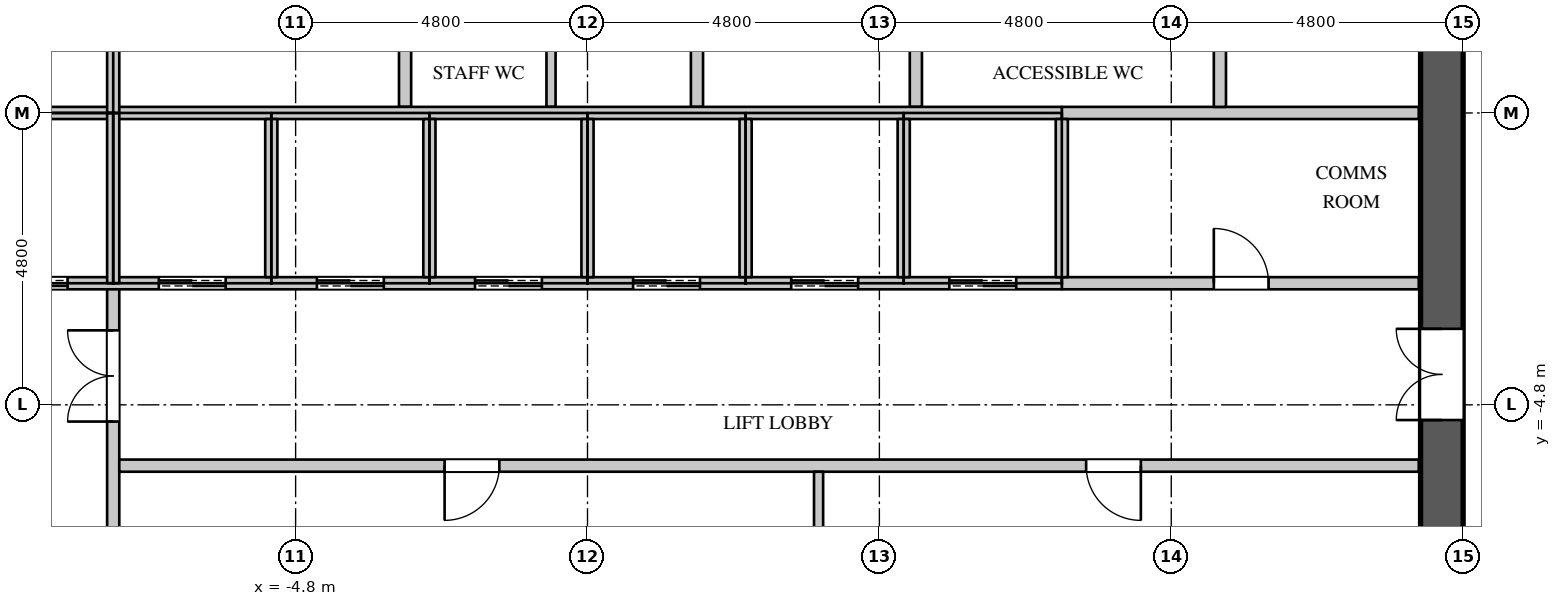
"""IFC4 building model, lengths in metres.
Left out: names, types, materials, properties, quantities, classifications, styles, units other than length and angle.
Written with IfcOpenShell. Run it as: python <this file> out.ifc"""

import sys

from ifc_helpers import new_model, si_unit, direction, frame, frame_2d, origin, place, context, subcontext, project, spatial, rectangle, extrude, element, fill, save


model = new_model("IFC4")
c1 = context("Model", 3, precision=1e-05, world=origin(), true_north=direction((0.0, 1.0)))
c2 = subcontext(c1, "Body", "Model", "MODEL_VIEW")
j1 = project(units=[si_unit("LENGTHUNIT", "METRE"), si_unit("PLANEANGLEUNIT", "RADIAN")], contexts=[c1])
p1 = place(None, origin())
s1 = spatial("IfcSite", under=j1, at=p1, CompositionType="ELEMENT")
p2 = place(p1, origin())
s2 = spatial("IfcBuilding", under=s1, at=p2, CompositionType="ELEMENT")
p3 = place(p2, frame((0.0, 0.0, 187.5)))
s3 = spatial("IfcBuildingStorey", under=s2, at=p3, CompositionType="ELEMENT", Elevation=187.5)
p4 = place(p3, frame((14.05, -11.3, 0.0), z_axis=(0.0, 0.0, 1.0), x_axis=(0.0, 1.0, 0.0)))
e1 = element("IfcWall", 1, at=p4, inside=s3, PredefinedType="SHEAR", context=c2, shape_type="SweptSolid", body=[
    extrude(rectangle(XDim=22.6, YDim=0.7, at=frame_2d((11.3, 0.0))), origin(), (0.0, 0.0, 1.0), 4.2),
])
p5 = place(p4, frame((20.35, 0.0, 0.0)))
e2 = element("IfcOpeningElement", 2, at=p5, cuts=e1, PredefinedType="OPENING", context=c2, shape_type="SweptSolid", body=[
    extrude(rectangle(XDim=1.1, YDim=2.2, at=frame_2d((0.55, 1.1))), frame((0.0, 0.36, 0.0), z_axis=(0.0, -1.0, 0.0), x_axis=(1.0, 0.0, 0.0)), (0.0, 0.0, 1.0), 0.72),
])
p6 = place(p4, frame((1.15, 0.0, 0.0)))
e3 = element("IfcOpeningElement", 3, at=p6, cuts=e1, PredefinedType="OPENING", context=c2, shape_type="SweptSolid", body=[
    extrude(rectangle(XDim=1.1, YDim=2.2, at=frame_2d((0.55, 1.1))), frame((0.0, 0.36, 0.0), z_axis=(0.0, -1.0, 0.0), x_axis=(1.0, 0.0, 0.0)), (0.0, 0.0, 1.0), 0.72),
])
p7 = place(p4, frame((14.85, 0.0, 0.0)))
e4 = element("IfcOpeningElement", 4, at=p7, cuts=e1, PredefinedType="OPENING", context=c2, shape_type="SweptSolid", body=[
    extrude(rectangle(XDim=1.5, YDim=2.4, at=frame_2d((0.75, 1.2))), frame((0.0, 0.36, 0.0), z_axis=(0.0, -1.0, 0.0), x_axis=(1.0, 0.0, 0.0)), (0.0, 0.0, 1.0), 0.72),
])
p8 = place(p4, frame((6.25, 0.0, 0.0)))
e5 = element("IfcOpeningElement", 5, at=p8, cuts=e1, PredefinedType="OPENING", context=c2, shape_type="SweptSolid", body=[
    extrude(rectangle(XDim=1.5, YDim=2.4, at=frame_2d((0.75, 1.2))), frame((0.0, 0.36, 0.0), z_axis=(0.0, -1.0, 0.0), x_axis=(1.0, 0.0, 0.0)), (0.0, 0.0, 1.0), 0.72),
])
p9 = place(p3, frame((-7.8, -8.075, 0.0), z_axis=(0.0, 0.0, 1.0), x_axis=(0.0, 1.0, 0.0)))
e6 = element("IfcWall", 6, at=p9, inside=s3, PredefinedType="PARTITIONING", context=c2, shape_type="SweptSolid", body=[
    extrude(rectangle(XDim=5.275, YDim=0.2, at=frame_2d((2.637, 0.0))), origin(), (0.0, 0.0, 1.0), 3.95),
])
p10 = place(p9, frame((3.0, 0.0, 0.0)))
e7 = element("IfcOpeningElement", 7, at=p10, cuts=e6, PredefinedType="OPENING", context=c2, shape_type="SweptSolid", body=[
    extrude(rectangle(XDim=1.5, YDim=2.4, at=frame_2d((0.75, 1.2))), frame((0.0, 0.11, 0.0), z_axis=(0.0, -1.0, 0.0), x_axis=(1.0, 0.0, 0.0)), (0.0, 0.0, 1.0), 0.22),
])
p11 = place(p3, frame((-7.7, -5.8, 0.0), z_axis=(0.0, 0.0, 1.0), x_axis=(1.0, 0.0, 0.0)))
e8 = element("IfcWall", 8, at=p11, inside=s3, PredefinedType="PARTITIONING", context=c2, shape_type="SweptSolid", body=[
    extrude(rectangle(XDim=21.37, YDim=0.2, at=frame_2d((10.685, 0.0))), origin(), (0.0, 0.0, 1.0), 3.95),
])
p12 = place(p11, frame((5.35, 0.0, 0.0)))
e9 = element("IfcOpeningElement", 9, at=p12, cuts=e8, PredefinedType="OPENING", context=c2, shape_type="SweptSolid", body=[
    extrude(rectangle(XDim=0.9, YDim=2.2, at=frame_2d((0.45, 1.1))), frame((0.0, 0.11, 0.0), z_axis=(0.0, -1.0, 0.0), x_axis=(1.0, 0.0, 0.0)), (0.0, 0.0, 1.0), 0.22),
])
p13 = place(p11, frame((15.9, 0.0, 0.0)))
e10 = element("IfcOpeningElement", 10, at=p13, cuts=e8, PredefinedType="OPENING", context=c2, shape_type="SweptSolid", body=[
    extrude(rectangle(XDim=0.9, YDim=2.2, at=frame_2d((0.45, 1.1))), frame((0.0, 0.11, 0.0), z_axis=(0.0, -1.0, 0.0), x_axis=(1.0, 0.0, 0.0)), (0.0, 0.0, 1.0), 0.22),
])
p14 = place(p3, frame((-0.6, 0.1, 0.0), z_axis=(0.0, 0.0, 1.0), x_axis=(0.0, 1.0, 0.0)))
e11 = element("IfcWall", 11, at=p14, inside=s3, PredefinedType="PARTITIONING", context=c2, shape_type="SweptSolid", body=[
    extrude(rectangle(XDim=2.6, YDim=0.15, at=frame_2d((1.3, 0.0))), origin(), (0.0, 0.0, 1.0), 3.95),
])
p15 = place(p3, frame((3.8, -11.27, 0.0), z_axis=(0.0, 0.0, 1.0), x_axis=(0.0, 1.0, 0.0)))
e12 = element("IfcWall", 12, at=p15, inside=s3, PredefinedType="PARTITIONING", context=c2, shape_type="SweptSolid", body=[
    extrude(rectangle(XDim=5.37, YDim=0.15, at=frame_2d((2.685, 0.0))), origin(), (0.0, 0.0, 1.0), 3.95),
])
for number, where, z_axis, x_axis in (
    (13, (-3.0, 0.1, 0.0), (0.0, 0.0, 1.0), (0.0, 1.0, 0.0)),
    (14, (1.8, 0.1, 0.0), (0.0, 0.0, 1.0), (0.0, 1.0, 0.0)),
    (15, (5.4, 0.1, 0.0), (0.0, 0.0, 1.0), (0.0, 1.0, 0.0)),
):
    element("IfcWall", number, at=place(p3, frame(where, z_axis=z_axis, x_axis=x_axis)), inside=s3, PredefinedType="PARTITIONING", context=c2, shape_type="SweptSolid", body=[
        extrude(rectangle(XDim=2.6, YDim=0.2, at=frame_2d((1.3, 0.0))), origin(), (0.0, 0.0, 1.0), 3.95),
    ])
p16 = place(p3, frame((7.8, -2.8, 0.0), z_axis=(0.0, 0.0, 1.0), x_axis=(1.0, 0.0, 0.0)))
e16 = element("IfcWall", 16, at=p16, inside=s3, PredefinedType="PARTITIONING", context=c2, shape_type="SweptSolid", body=[
    extrude(rectangle(XDim=5.87, YDim=0.2, at=frame_2d((2.935, 0.0))), origin(), (0.0, 0.0, 1.0), 3.95),
])
p17 = place(p16, frame((2.5, 0.0, 0.0)))
e17 = element("IfcOpeningElement", 17, at=p17, cuts=e16, PredefinedType="OPENING", context=c2, shape_type="SweptSolid", body=[
    extrude(rectangle(XDim=0.9, YDim=2.2, at=frame_2d((0.45, 1.1))), frame((0.0, 0.11, 0.0), z_axis=(0.0, -1.0, 0.0), x_axis=(1.0, 0.0, 0.0)), (0.0, 0.0, 1.0), 0.22),
])
p18 = place(p3, frame((7.8, 0.0, 0.0), z_axis=(0.0, 0.0, 1.0), x_axis=(1.0, 0.0, 0.0)))
e18 = element("IfcWall", 18, at=p18, inside=s3, PredefinedType="PARTITIONING", context=c2, shape_type="SweptSolid", body=[
    extrude(rectangle(XDim=5.87, YDim=0.2, at=frame_2d((2.935, 0.0))), origin(), (0.0, 0.0, 1.0), 3.95),
])
p19 = place(p3, frame((10.4, 0.1, 0.0), z_axis=(0.0, 0.0, 1.0), x_axis=(0.0, 1.0, 0.0)))
e19 = element("IfcWall", 19, at=p19, inside=s3, PredefinedType="PARTITIONING", context=c2, shape_type="SweptSolid", body=[
    extrude(rectangle(XDim=2.6, YDim=0.2, at=frame_2d((1.3, 0.0))), origin(), (0.0, 0.0, 1.0), 3.95),
])
p20 = place(p3, frame((-13.67, 0.0, 0.0), z_axis=(0.0, 0.0, 1.0), x_axis=(1.0, 0.0, 0.0)))
e20 = element("IfcWall", 20, at=p20, inside=s3, PredefinedType="PARTITIONING", context=c2, shape_type="SweptSolid", body=[
    extrude(rectangle(XDim=21.47, YDim=0.2, at=frame_2d((10.735, 0.0))), origin(), (0.0, 0.0, 1.0), 3.95),
])
p21 = place(p3, frame((-10.4, -2.8, 0.0), z_axis=(0.0, 0.0, 1.0), x_axis=(1.0, 0.0, 0.0)))
e21 = element("IfcWall", 21, at=p21, inside=s3, PredefinedType="PARTITIONING", context=c2, shape_type="SweptSolid", body=[
    extrude(rectangle(XDim=18.2, YDim=0.2, at=frame_2d((9.1, 0.0))), origin(), (0.0, 0.0, 1.0), 3.95),
])
p22 = place(p21, frame((0.75, 0.0, 0.0)))
e22 = element("IfcOpeningElement", 22, at=p22, cuts=e21, PredefinedType="OPENING", context=c2, shape_type="SweptSolid", body=[
    extrude(rectangle(XDim=1.1, YDim=2.2, at=frame_2d((0.55, 1.1))), frame((0.0, 0.11, 0.0), z_axis=(0.0, -1.0, 0.0), x_axis=(1.0, 0.0, 0.0)), (0.0, 0.0, 1.0), 0.22),
])
p23 = place(p21, frame((3.35, 0.0, 0.0)))
e23 = element("IfcOpeningElement", 23, at=p23, cuts=e21, PredefinedType="OPENING", context=c2, shape_type="SweptSolid", body=[
    extrude(rectangle(XDim=1.1, YDim=2.2, at=frame_2d((0.55, 1.1))), frame((0.0, 0.11, 0.0), z_axis=(0.0, -1.0, 0.0), x_axis=(1.0, 0.0, 0.0)), (0.0, 0.0, 1.0), 0.22),
])
p24 = place(p21, frame((5.95, 0.0, 0.0)))
e24 = element("IfcOpeningElement", 24, at=p24, cuts=e21, PredefinedType="OPENING", context=c2, shape_type="SweptSolid", body=[
    extrude(rectangle(XDim=1.1, YDim=2.2, at=frame_2d((0.55, 1.1))), frame((0.0, 0.11, 0.0), z_axis=(0.0, -1.0, 0.0), x_axis=(1.0, 0.0, 0.0)), (0.0, 0.0, 1.0), 0.22),
])
p25 = place(p21, frame((8.55, 0.0, 0.0)))
e25 = element("IfcOpeningElement", 25, at=p25, cuts=e21, PredefinedType="OPENING", context=c2, shape_type="SweptSolid", body=[
    extrude(rectangle(XDim=1.1, YDim=2.2, at=frame_2d((0.55, 1.1))), frame((0.0, 0.11, 0.0), z_axis=(0.0, -1.0, 0.0), x_axis=(1.0, 0.0, 0.0)), (0.0, 0.0, 1.0), 0.22),
])
p26 = place(p21, frame((11.15, 0.0, 0.0)))
e26 = element("IfcOpeningElement", 26, at=p26, cuts=e21, PredefinedType="OPENING", context=c2, shape_type="SweptSolid", body=[
    extrude(rectangle(XDim=1.1, YDim=2.2, at=frame_2d((0.55, 1.1))), frame((0.0, 0.11, 0.0), z_axis=(0.0, -1.0, 0.0), x_axis=(1.0, 0.0, 0.0)), (0.0, 0.0, 1.0), 0.22),
])
p27 = place(p21, frame((13.75, 0.0, 0.0)))
e27 = element("IfcOpeningElement", 27, at=p27, cuts=e21, PredefinedType="OPENING", context=c2, shape_type="SweptSolid", body=[
    extrude(rectangle(XDim=1.1, YDim=2.2, at=frame_2d((0.55, 1.1))), frame((0.0, 0.11, 0.0), z_axis=(0.0, -1.0, 0.0), x_axis=(1.0, 0.0, 0.0)), (0.0, 0.0, 1.0), 0.22),
])
p28 = place(p21, frame((16.35, 0.0, 0.0)))
e28 = element("IfcOpeningElement", 28, at=p28, cuts=e21, PredefinedType="OPENING", context=c2, shape_type="SweptSolid", body=[
    extrude(rectangle(XDim=1.1, YDim=2.2, at=frame_2d((0.55, 1.1))), frame((0.0, 0.11, 0.0), z_axis=(0.0, -1.0, 0.0), x_axis=(1.0, 0.0, 0.0)), (0.0, 0.0, 1.0), 0.22),
])
for number, where, z_axis, x_axis in (
    (29, (-7.8, -2.8, 0.0), (0.0, 0.0, 1.0), (0.0, 1.0, 0.0)),
    (30, (-7.8, 0.0, 0.0), (0.0, 0.0, 1.0), (0.0, 1.0, 0.0)),
):
    element("IfcWall", number, at=place(p3, frame(where, z_axis=z_axis, x_axis=x_axis)), inside=s3, PredefinedType="PARTITIONING", context=c2, shape_type="SweptSolid", body=[
        extrude(rectangle(XDim=2.8, YDim=0.2, at=frame_2d((1.4, 0.0))), origin(), (0.0, 0.0, 1.0), 3.95),
    ])
for number, where, z_axis, x_axis in (
    (31, (-5.2, -2.7, 0.0), (0.0, 0.0, 1.0), (0.0, 1.0, 0.0)),
    (32, (-2.6, -2.7, 0.0), (0.0, 0.0, 1.0), (0.0, 1.0, 0.0)),
    (33, (0.0, -2.7, 0.0), (0.0, 0.0, 1.0), (0.0, 1.0, 0.0)),
    (34, (2.6, -2.7, 0.0), (0.0, 0.0, 1.0), (0.0, 1.0, 0.0)),
    (35, (5.2, -2.7, 0.0), (0.0, 0.0, 1.0), (0.0, 1.0, 0.0)),
    (36, (7.8, -2.7, 0.0), (0.0, 0.0, 1.0), (0.0, 1.0, 0.0)),
):
    element("IfcWall", number, at=place(p3, frame(where, z_axis=z_axis, x_axis=x_axis)), inside=s3, PredefinedType="PARTITIONING", context=c2, shape_type="SweptSolid", body=[
        extrude(rectangle(XDim=2.6, YDim=0.2, at=frame_2d((1.3, 0.0))), origin(), (0.0, 0.0, 1.0), 3.95),
    ])
p29 = place(p17, origin())
e37 = element("IfcDoor", 37, at=p29, inside=s3, OperationType="SINGLE_SWING_LEFT", PredefinedType="DOOR", context=c2, shape_type="SweptSolid", body=[
    extrude(rectangle(XDim=0.9, YDim=2.2, at=frame_2d((0.45, 1.1))), frame((0.0, 0.025, 0.0), z_axis=(0.0, -1.0, 0.0), x_axis=(1.0, 0.0, 0.0)), (0.0, 0.0, 1.0), 0.05),
])
fill(e17, e37)
p30 = place(p12, origin())
e38 = element("IfcDoor", 38, at=p30, inside=s3, OperationType="SINGLE_SWING_RIGHT", PredefinedType="DOOR", context=c2, shape_type="SweptSolid", body=[
    extrude(rectangle(XDim=0.9, YDim=2.2, at=frame_2d((0.45, 1.1))), frame((0.0, 0.025, 0.0), z_axis=(0.0, -1.0, 0.0), x_axis=(1.0, 0.0, 0.0)), (0.0, 0.0, 1.0), 0.05),
])
fill(e9, e38)
p31 = place(p13, origin())
e39 = element("IfcDoor", 39, at=p31, inside=s3, OperationType="SINGLE_SWING_LEFT", PredefinedType="DOOR", context=c2, shape_type="SweptSolid", body=[
    extrude(rectangle(XDim=0.9, YDim=2.2, at=frame_2d((0.45, 1.1))), frame((0.0, 0.025, 0.0), z_axis=(0.0, -1.0, 0.0), x_axis=(1.0, 0.0, 0.0)), (0.0, 0.0, 1.0), 0.05),
])
fill(e10, e39)
p32 = place(p22, origin())
e40 = element("IfcDoor", 40, at=p32, inside=s3, OperationType="DOUBLE_DOOR_SLIDING", PredefinedType="DOOR", context=c2, shape_type="SweptSolid", body=[
    extrude(rectangle(XDim=1.1, YDim=2.2, at=frame_2d((0.55, 1.1))), frame((0.0, 0.025, 0.0), z_axis=(0.0, -1.0, 0.0), x_axis=(1.0, 0.0, 0.0)), (0.0, 0.0, 1.0), 0.05),
])
fill(e22, e40)
p33 = place(p23, origin())
e41 = element("IfcDoor", 41, at=p33, inside=s3, OperationType="DOUBLE_DOOR_SLIDING", PredefinedType="DOOR", context=c2, shape_type="SweptSolid", body=[
    extrude(rectangle(XDim=1.1, YDim=2.2, at=frame_2d((0.55, 1.1))), frame((0.0, 0.025, 0.0), z_axis=(0.0, -1.0, 0.0), x_axis=(1.0, 0.0, 0.0)), (0.0, 0.0, 1.0), 0.05),
])
fill(e23, e41)
p34 = place(p24, origin())
e42 = element("IfcDoor", 42, at=p34, inside=s3, OperationType="DOUBLE_DOOR_SLIDING", PredefinedType="DOOR", context=c2, shape_type="SweptSolid", body=[
    extrude(rectangle(XDim=1.1, YDim=2.2, at=frame_2d((0.55, 1.1))), frame((0.0, 0.025, 0.0), z_axis=(0.0, -1.0, 0.0), x_axis=(1.0, 0.0, 0.0)), (0.0, 0.0, 1.0), 0.05),
])
fill(e24, e42)
p35 = place(p25, origin())
e43 = element("IfcDoor", 43, at=p35, inside=s3, OperationType="DOUBLE_DOOR_SLIDING", PredefinedType="DOOR", context=c2, shape_type="SweptSolid", body=[
    extrude(rectangle(XDim=1.1, YDim=2.2, at=frame_2d((0.55, 1.1))), frame((0.0, 0.025, 0.0), z_axis=(0.0, -1.0, 0.0), x_axis=(1.0, 0.0, 0.0)), (0.0, 0.0, 1.0), 0.05),
])
fill(e25, e43)
p36 = place(p26, origin())
e44 = element("IfcDoor", 44, at=p36, inside=s3, OperationType="DOUBLE_DOOR_SLIDING", PredefinedType="DOOR", context=c2, shape_type="SweptSolid", body=[
    extrude(rectangle(XDim=1.1, YDim=2.2, at=frame_2d((0.55, 1.1))), frame((0.0, 0.025, 0.0), z_axis=(0.0, -1.0, 0.0), x_axis=(1.0, 0.0, 0.0)), (0.0, 0.0, 1.0), 0.05),
])
fill(e26, e44)
p37 = place(p27, origin())
e45 = element("IfcDoor", 45, at=p37, inside=s3, OperationType="DOUBLE_DOOR_SLIDING", PredefinedType="DOOR", context=c2, shape_type="SweptSolid", body=[
    extrude(rectangle(XDim=1.1, YDim=2.2, at=frame_2d((0.55, 1.1))), frame((0.0, 0.025, 0.0), z_axis=(0.0, -1.0, 0.0), x_axis=(1.0, 0.0, 0.0)), (0.0, 0.0, 1.0), 0.05),
])
fill(e27, e45)
p38 = place(p28, origin())
e46 = element("IfcDoor", 46, at=p38, inside=s3, OperationType="DOUBLE_DOOR_SLIDING", PredefinedType="DOOR", context=c2, shape_type="SweptSolid", body=[
    extrude(rectangle(XDim=1.1, YDim=2.2, at=frame_2d((0.55, 1.1))), frame((0.0, 0.025, 0.0), z_axis=(0.0, -1.0, 0.0), x_axis=(1.0, 0.0, 0.0)), (0.0, 0.0, 1.0), 0.05),
])
fill(e28, e46)
p39 = place(p10, origin())
e47 = element("IfcDoor", 47, at=p39, inside=s3, OperationType="DOUBLE_DOOR_SINGLE_SWING", PredefinedType="DOOR", context=c2, shape_type="SweptSolid", body=[
    extrude(rectangle(XDim=1.5, YDim=2.4, at=frame_2d((0.75, 1.2))), frame((0.0, 0.025, 0.0), z_axis=(0.0, -1.0, 0.0), x_axis=(1.0, 0.0, 0.0)), (0.0, 0.0, 1.0), 0.05),
])
fill(e7, e47)
p40 = place(p8, origin())
e48 = element("IfcDoor", 48, at=p40, inside=s3, OperationType="DOUBLE_DOOR_SINGLE_SWING", PredefinedType="DOOR", context=c2, shape_type="SweptSolid", body=[
    extrude(rectangle(XDim=1.5, YDim=2.4, at=frame_2d((0.75, 1.2))), frame((0.0, 0.345, 0.0), z_axis=(0.0, -1.0, 0.0), x_axis=(1.0, 0.0, 0.0)), (0.0, 0.0, 1.0), 0.05),
])
fill(e5, e48)
save(model, sys.argv[1])
